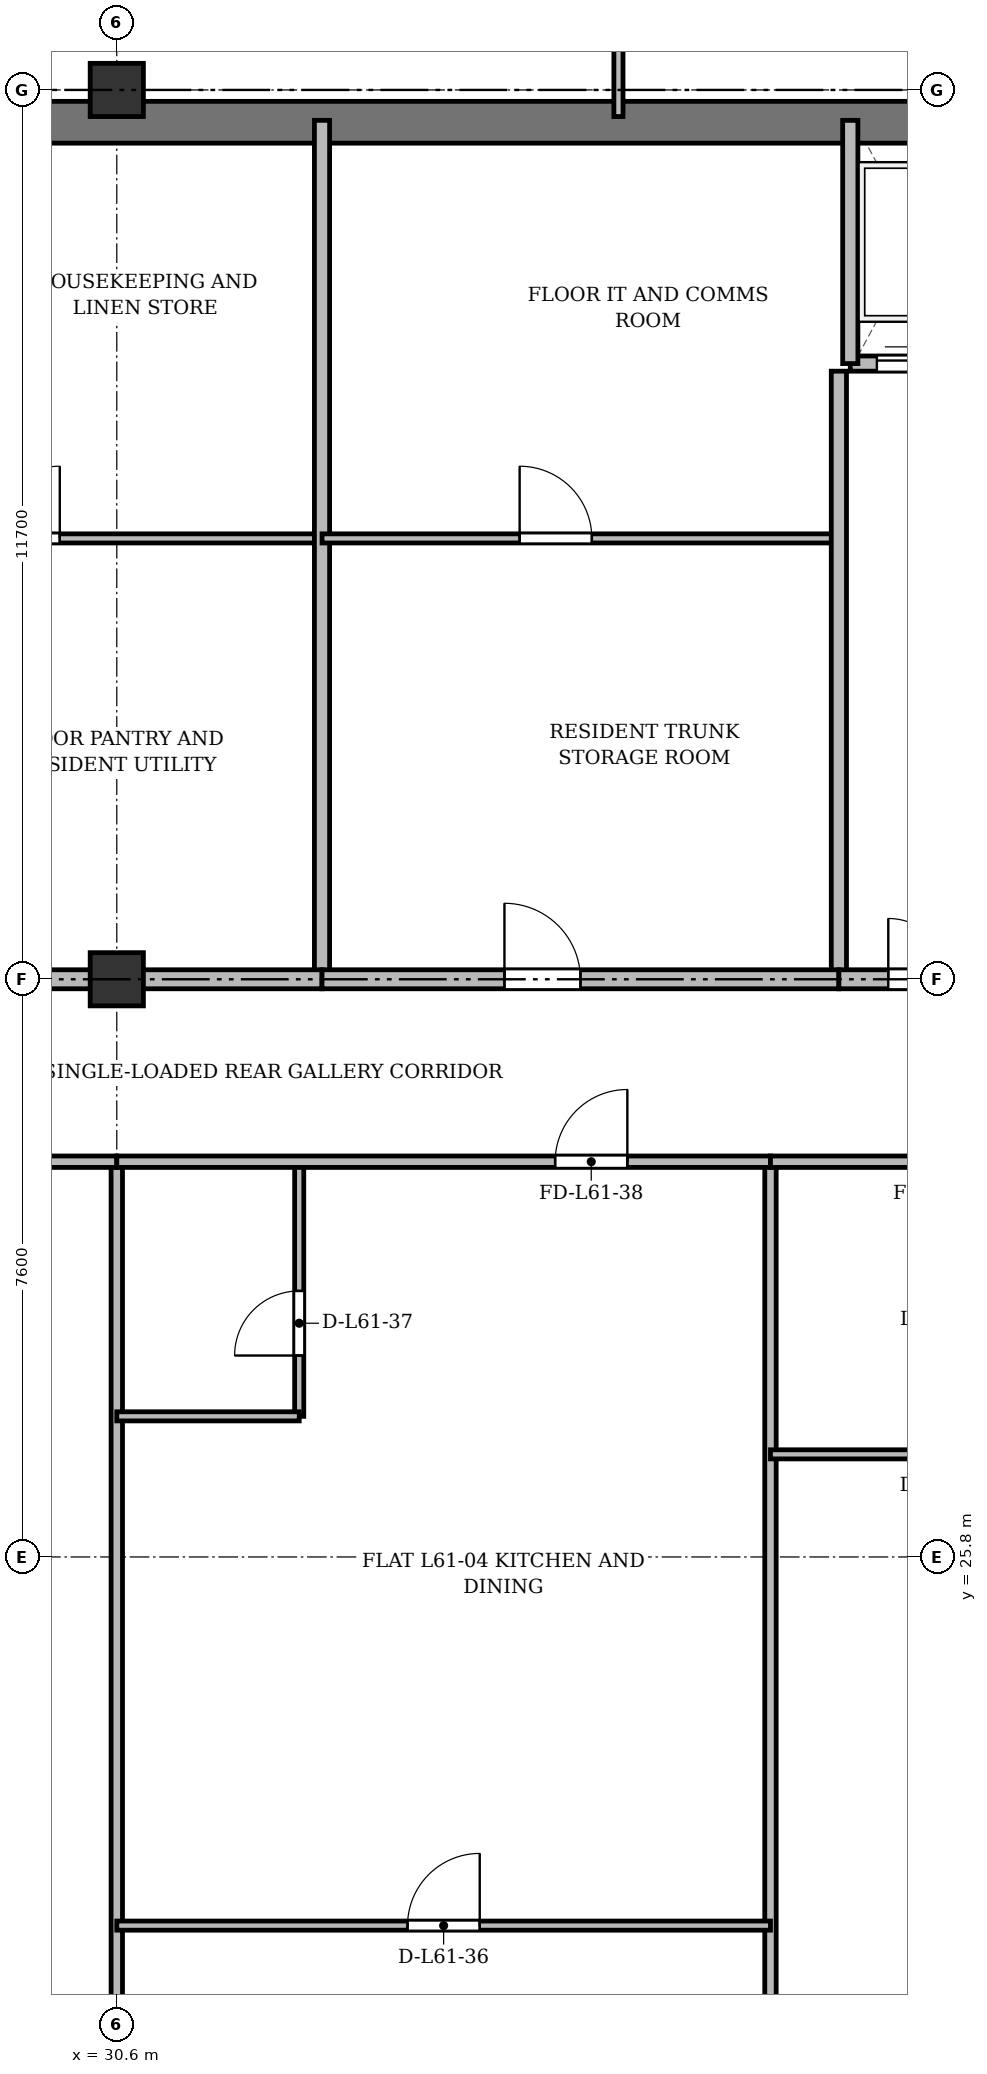
"""IFC4 building model, lengths in metres.
Left out: names, types, materials, properties, quantities, classifications, styles, units other than length and angle.
Written with IfcOpenShell. Run it as: python <this file> out.ifc"""

import sys

from ifc_helpers import new_model, si_unit, direction, frame, frame_2d, origin, origin_2d, place, context, subcontext, project, spatial, rectangle, extrude, source, transform, mapped, element, fill, save


model = new_model("IFC4")
c1 = context("Model", 3, precision=1e-05, world=origin(), true_north=direction((0.0, 1.0)))
c2 = subcontext(c1, "Body", "Model", "MODEL_VIEW")
j1 = project(units=[si_unit("LENGTHUNIT", "METRE"), si_unit("PLANEANGLEUNIT", "RADIAN")], contexts=[c1])
p1 = place(None, origin())
s1 = spatial("IfcSite", under=j1, at=p1, CompositionType="ELEMENT")
p2 = place(p1, origin())
s2 = spatial("IfcBuilding", under=s1, at=p2, CompositionType="ELEMENT")
p3 = place(p2, frame((0.0, 0.0, 233.7)))
s3 = spatial("IfcBuildingStorey", under=s2, at=p3, CompositionType="ELEMENT", Elevation=233.7)
m1 = source(origin(), c2, "Body", "SweptSolid", [
    extrude(rectangle(XDim=0.7, YDim=0.7, at=origin_2d()), origin(), (0.0, 0.0, 1.0), 3.6),
])
for number, where, z_axis, x_axis in (
    (1, (30.6, 33.4, 0.0), (0.0, 0.0, 1.0), (1.0, 0.0, 0.0)),
    (2, (30.6, 45.1, 0.0), (0.0, 0.0, 1.0), (1.0, 0.0, 0.0)),
):
    element("IfcColumn", number, at=place(p3, frame(where, z_axis=z_axis, x_axis=x_axis)), inside=s3, PredefinedType="COLUMN", context=c2, shape_type="MappedRepresentation", body=[
        mapped(m1, transform((0.0, 0.0, 0.0), x_axis=(1.0, 0.0, 0.0), y_axis=(0.0, 1.0, 0.0), z_axis=(0.0, 0.0, 1.0), scale=1.0)),
    ])
p4 = place(p3, frame((15.65, 44.675, 0.0), z_axis=(0.0, 0.0, 1.0), x_axis=(1.0, 0.0, 0.0)))
e3 = element("IfcWall", 3, at=p4, inside=s3, PredefinedType="SHEAR", context=c2, shape_type="SweptSolid", body=[
    extrude(rectangle(XDim=43.1, YDim=0.55, at=frame_2d((21.55, 0.0))), origin(), (0.0, 0.0, 1.0), 3.36),
])
p5 = place(p3, frame((26.3, 39.2, 0.0), z_axis=(0.0, 0.0, 1.0), x_axis=(1.0, 0.0, 0.0)))
e4 = element("IfcWall", 4, at=p5, inside=s3, PredefinedType="PARTITIONING", context=c2, shape_type="SweptSolid", body=[
    extrude(rectangle(XDim=7.0, YDim=0.12, at=frame_2d((3.5, 0.0))), origin(), (0.0, 0.0, 1.0), 2.86),
])
p6 = place(p5, frame((2.6, 0.0, 0.0)))
e5 = element("IfcOpeningElement", 5, at=p6, cuts=e4, PredefinedType="OPENING", context=c2, shape_type="SweptSolid", body=[
    extrude(rectangle(XDim=0.95, YDim=2.15, at=frame_2d((0.475, 1.075))), frame((0.0, 0.07, 0.0), z_axis=(0.0, -1.0, 0.0), x_axis=(1.0, 0.0, 0.0)), (0.0, 0.0, 1.0), 0.14),
])
p7 = place(p3, frame((33.3, 33.4, 0.0), z_axis=(0.0, 0.0, 1.0), x_axis=(0.0, 1.0, 0.0)))
e6 = element("IfcWall", 6, at=p7, inside=s3, PredefinedType="SOLIDWALL", context=c2, shape_type="SweptSolid", body=[
    extrude(rectangle(XDim=11.3, YDim=0.2, at=frame_2d((5.65, 0.0))), origin(), (0.0, 0.0, 1.0), 2.91),
])
p8 = place(p3, frame((33.3, 39.2, 0.0), z_axis=(0.0, 0.0, 1.0), x_axis=(1.0, 0.0, 0.0)))
e7 = element("IfcWall", 7, at=p8, inside=s3, PredefinedType="PARTITIONING", context=c2, shape_type="SweptSolid", body=[
    extrude(rectangle(XDim=6.8, YDim=0.12, at=frame_2d((3.4, 0.0))), origin(), (0.0, 0.0, 1.0), 3.36),
])
p9 = place(p8, frame((2.6, 0.0, 0.0)))
e8 = element("IfcOpeningElement", 8, at=p9, cuts=e7, PredefinedType="OPENING", context=c2, shape_type="SweptSolid", body=[
    extrude(rectangle(XDim=0.95, YDim=2.15, at=frame_2d((0.475, 1.075))), frame((0.0, 0.07, 0.0), z_axis=(0.0, -1.0, 0.0), x_axis=(1.0, 0.0, 0.0)), (0.0, 0.0, 1.0), 0.14),
])
p10 = place(p3, frame((40.1, 33.4, 0.0), z_axis=(0.0, 0.0, 1.0), x_axis=(0.0, 1.0, 0.0)))
e9 = element("IfcWall", 9, at=p10, inside=s3, PredefinedType="SOLIDWALL", context=c2, shape_type="SweptSolid", body=[
    extrude(rectangle(XDim=8.0, YDim=0.2, at=frame_2d((4.0, 0.0))), origin(), (0.0, 0.0, 1.0), 2.91),
])
p11 = place(p3, frame((40.25, 41.5, 0.0), z_axis=(0.0, 0.0, 1.0), x_axis=(1.0, 0.0, 0.0)))
e10 = element("IfcWall", 10, at=p11, inside=s3, PredefinedType="SOLIDWALL", context=c2, shape_type="SweptSolid", body=[
    extrude(rectangle(XDim=6.9, YDim=0.2, at=frame_2d((3.45, 0.0))), origin(), (0.0, 0.0, 1.0), 3.36),
])
p12 = place(p11, frame((0.35, 0.0, 0.0)))
e11 = element("IfcOpeningElement", 11, at=p12, cuts=e10, PredefinedType="OPENING", context=c2, shape_type="SweptSolid", body=[
    extrude(rectangle(XDim=1.05, YDim=2.15, at=frame_2d((0.525, 1.075))), frame((0.0, 0.11, 0.0), z_axis=(0.0, -1.0, 0.0), x_axis=(1.0, 0.0, 0.0)), (0.0, 0.0, 1.0), 0.22),
])
p13 = place(p11, frame((2.05, 0.0, 0.0)))
e12 = element("IfcOpeningElement", 12, at=p13, cuts=e10, PredefinedType="OPENING", context=c2, shape_type="SweptSolid", body=[
    extrude(rectangle(XDim=1.05, YDim=2.15, at=frame_2d((0.525, 1.075))), frame((0.0, 0.11, 0.0), z_axis=(0.0, -1.0, 0.0), x_axis=(1.0, 0.0, 0.0)), (0.0, 0.0, 1.0), 0.22),
])
p14 = place(p11, frame((3.75, 0.0, 0.0)))
e13 = element("IfcOpeningElement", 13, at=p14, cuts=e10, PredefinedType="OPENING", context=c2, shape_type="SweptSolid", body=[
    extrude(rectangle(XDim=1.05, YDim=2.15, at=frame_2d((0.525, 1.075))), frame((0.0, 0.11, 0.0), z_axis=(0.0, -1.0, 0.0), x_axis=(1.0, 0.0, 0.0)), (0.0, 0.0, 1.0), 0.22),
])
p15 = place(p11, frame((5.45, 0.0, 0.0)))
e14 = element("IfcOpeningElement", 14, at=p15, cuts=e10, PredefinedType="OPENING", context=c2, shape_type="SweptSolid", body=[
    extrude(rectangle(XDim=1.05, YDim=2.15, at=frame_2d((0.525, 1.075))), frame((0.0, 0.11, 0.0), z_axis=(0.0, -1.0, 0.0), x_axis=(1.0, 0.0, 0.0)), (0.0, 0.0, 1.0), 0.22),
])
p16 = place(p3, frame((40.25, 41.5, 0.0), z_axis=(0.0, 0.0, 1.0), x_axis=(0.0, 1.0, 0.0)))
e15 = element("IfcWall", 15, at=p16, inside=s3, PredefinedType="SOLIDWALL", context=c2, shape_type="SweptSolid", body=[
    extrude(rectangle(XDim=3.2, YDim=0.2, at=frame_2d((1.6, 0.0))), origin(), (0.0, 0.0, 1.0), 3.36),
])
p17 = place(p3, frame((26.3, 33.4, 0.0), z_axis=(0.0, 0.0, 1.0), x_axis=(1.0, 0.0, 0.0)))
e16 = element("IfcWall", 16, at=p17, inside=s3, PredefinedType="PARTITIONING", context=c2, shape_type="SweptSolid", body=[
    extrude(rectangle(XDim=7.0, YDim=0.25, at=frame_2d((3.5, 0.0))), origin(), (0.0, 0.0, 1.0), 2.91),
])
p18 = place(p17, frame((1.35, 0.0, 0.0)))
e17 = element("IfcOpeningElement", 17, at=p18, cuts=e16, PredefinedType="OPENING", context=c2, shape_type="SweptSolid", body=[
    extrude(rectangle(XDim=0.95, YDim=2.15, at=frame_2d((0.475, 1.075))), frame((0.0, 0.135, 0.0), z_axis=(0.0, -1.0, 0.0), x_axis=(1.0, 0.0, 0.0)), (0.0, 0.0, 1.0), 0.27),
])
p19 = place(p3, frame((33.3, 33.4, 0.0), z_axis=(0.0, 0.0, 1.0), x_axis=(1.0, 0.0, 0.0)))
e18 = element("IfcWall", 18, at=p19, inside=s3, PredefinedType="PARTITIONING", context=c2, shape_type="SweptSolid", body=[
    extrude(rectangle(XDim=6.8, YDim=0.25, at=frame_2d((3.4, 0.0))), origin(), (0.0, 0.0, 1.0), 2.91),
])
p20 = place(p19, frame((2.4, 0.0, 0.0)))
e19 = element("IfcOpeningElement", 19, at=p20, cuts=e18, PredefinedType="OPENING", context=c2, shape_type="SweptSolid", body=[
    extrude(rectangle(XDim=1.0, YDim=2.15, at=frame_2d((0.5, 1.075))), frame((0.0, 0.135, 0.0), z_axis=(0.0, -1.0, 0.0), x_axis=(1.0, 0.0, 0.0)), (0.0, 0.0, 1.0), 0.27),
])
p21 = place(p3, frame((40.1, 33.4, 0.0), z_axis=(0.0, 0.0, 1.0), x_axis=(1.0, 0.0, 0.0)))
e20 = element("IfcWall", 20, at=p21, inside=s3, PredefinedType="PARTITIONING", context=c2, shape_type="SweptSolid", body=[
    extrude(rectangle(XDim=7.05, YDim=0.25, at=frame_2d((3.525, 0.0))), origin(), (0.0, 0.0, 1.0), 2.91),
])
p22 = place(p21, frame((0.65, 0.0, 0.0)))
e21 = element("IfcOpeningElement", 21, at=p22, cuts=e20, PredefinedType="OPENING", context=c2, shape_type="SweptSolid", body=[
    extrude(rectangle(XDim=1.6, YDim=2.2, at=frame_2d((0.8, 1.1))), frame((0.0, 0.135, 0.0), z_axis=(0.0, -1.0, 0.0), x_axis=(1.0, 0.0, 0.0)), (0.0, 0.0, 1.0), 0.27),
])
p23 = place(p3, frame((37.2, 44.75, 0.0), z_axis=(0.0, 0.0, 1.0), x_axis=(0.0, 1.0, 0.0)))
e22 = element("IfcWall", 22, at=p23, inside=s3, PredefinedType="PARTITIONING", context=c2, shape_type="SweptSolid", body=[
    extrude(rectangle(XDim=3.61, YDim=0.12, at=frame_2d((1.805, 0.0))), origin(), (0.0, 0.0, 1.0), 2.91),
])
p24 = place(p23, frame((1.1, 0.0, 0.0)))
e23 = element("IfcOpeningElement", 23, at=p24, cuts=e22, PredefinedType="OPENING", context=c2, shape_type="SweptSolid", body=[
    extrude(rectangle(XDim=0.95, YDim=2.15, at=frame_2d((0.475, 1.075))), frame((0.0, 0.07, 0.0), z_axis=(0.0, -1.0, 0.0), x_axis=(1.0, 0.0, 0.0)), (0.0, 0.0, 1.0), 0.14),
])
p25 = place(p3, frame((30.6, 3.625, 0.0), z_axis=(0.0, 0.0, 1.0), x_axis=(0.0, 1.0, 0.0)))
e24 = element("IfcWall", 24, at=p25, inside=s3, PredefinedType="PARTITIONING", context=c2, shape_type="SweptSolid", body=[
    extrude(rectangle(XDim=27.375, YDim=0.15, at=frame_2d((13.688, 0.0))), origin(), (0.0, 0.0, 1.0), 2.86),
])
p26 = place(p3, frame((39.2, 3.625, 0.0), z_axis=(0.0, 0.0, 1.0), x_axis=(0.0, 1.0, 0.0)))
e25 = element("IfcWall", 25, at=p26, inside=s3, PredefinedType="PARTITIONING", context=c2, shape_type="SweptSolid", body=[
    extrude(rectangle(XDim=27.375, YDim=0.15, at=frame_2d((13.688, 0.0))), origin(), (0.0, 0.0, 1.0), 2.91),
])
p27 = place(p3, frame((23.4, 31.0, 0.0), z_axis=(0.0, 0.0, 1.0), x_axis=(1.0, 0.0, 0.0)))
e26 = element("IfcWall", 26, at=p27, inside=s3, PredefinedType="PARTITIONING", context=c2, shape_type="SweptSolid", body=[
    extrude(rectangle(XDim=7.2, YDim=0.15, at=frame_2d((3.6, 0.0))), origin(), (0.0, 0.0, 1.0), 2.86),
])
p28 = place(p27, frame((3.125, 0.0, 0.0)))
e27 = element("IfcOpeningElement", 27, at=p28, cuts=e26, PredefinedType="OPENING", context=c2, shape_type="SweptSolid", body=[
    extrude(rectangle(XDim=0.95, YDim=2.15, at=frame_2d((0.475, 1.075))), frame((0.0, 0.085, 0.0), z_axis=(0.0, -1.0, 0.0), x_axis=(1.0, 0.0, 0.0)), (0.0, 0.0, 1.0), 0.17),
])
p29 = place(p3, frame((30.6, 20.95, 0.0), z_axis=(0.0, 0.0, 1.0), x_axis=(1.0, 0.0, 0.0)))
e28 = element("IfcWall", 28, at=p29, inside=s3, PredefinedType="PARTITIONING", context=c2, shape_type="SweptSolid", body=[
    extrude(rectangle(XDim=8.6, YDim=0.12, at=frame_2d((4.3, 0.0))), origin(), (0.0, 0.0, 1.0), 2.86),
])
p30 = place(p29, frame((3.825, 0.0, 0.0)))
e29 = element("IfcOpeningElement", 29, at=p30, cuts=e28, PredefinedType="OPENING", context=c2, shape_type="SweptSolid", body=[
    extrude(rectangle(XDim=0.95, YDim=2.15, at=frame_2d((0.475, 1.075))), frame((0.0, 0.07, 0.0), z_axis=(0.0, -1.0, 0.0), x_axis=(1.0, 0.0, 0.0)), (0.0, 0.0, 1.0), 0.14),
])
p31 = place(p3, frame((33.0, 27.65, 0.0), z_axis=(0.0, 0.0, 1.0), x_axis=(0.0, 1.0, 0.0)))
e30 = element("IfcWall", 30, at=p31, inside=s3, PredefinedType="PARTITIONING", context=c2, shape_type="SweptSolid", body=[
    extrude(rectangle(XDim=3.35, YDim=0.12, at=frame_2d((1.675, 0.0))), origin(), (0.0, 0.0, 1.0), 3.36),
])
p32 = place(p31, frame((0.8, 0.0, 0.0)))
e31 = element("IfcOpeningElement", 31, at=p32, cuts=e30, PredefinedType="OPENING", context=c2, shape_type="SweptSolid", body=[
    extrude(rectangle(XDim=0.85, YDim=2.1, at=frame_2d((0.425, 1.05))), frame((0.0, 0.07, 0.0), z_axis=(0.0, -1.0, 0.0), x_axis=(1.0, 0.0, 0.0)), (0.0, 0.0, 1.0), 0.14),
])
p33 = place(p3, frame((30.6, 27.65, 0.0), z_axis=(0.0, 0.0, 1.0), x_axis=(1.0, 0.0, 0.0)))
e32 = element("IfcWall", 32, at=p33, inside=s3, PredefinedType="PARTITIONING", context=c2, shape_type="SweptSolid", body=[
    extrude(rectangle(XDim=2.4, YDim=0.12, at=frame_2d((1.2, 0.0))), origin(), (0.0, 0.0, 1.0), 2.86),
])
p34 = place(p3, frame((30.6, 31.0, 0.0), z_axis=(0.0, 0.0, 1.0), x_axis=(1.0, 0.0, 0.0)))
e33 = element("IfcWall", 33, at=p34, inside=s3, PredefinedType="PARTITIONING", context=c2, shape_type="SweptSolid", body=[
    extrude(rectangle(XDim=8.6, YDim=0.15, at=frame_2d((4.3, 0.0))), origin(), (0.0, 0.0, 1.0), 2.86),
])
p35 = place(p34, frame((5.767, 0.0, 0.0)))
e34 = element("IfcOpeningElement", 34, at=p35, cuts=e33, PredefinedType="OPENING", context=c2, shape_type="SweptSolid", body=[
    extrude(rectangle(XDim=0.95, YDim=2.15, at=frame_2d((0.475, 1.075))), frame((0.0, 0.085, 0.0), z_axis=(0.0, -1.0, 0.0), x_axis=(1.0, 0.0, 0.0)), (0.0, 0.0, 1.0), 0.17),
])
p36 = place(p3, frame((39.2, 31.0, 0.0), z_axis=(0.0, 0.0, 1.0), x_axis=(1.0, 0.0, 0.0)))
e35 = element("IfcWall", 35, at=p36, inside=s3, PredefinedType="PARTITIONING", context=c2, shape_type="SweptSolid", body=[
    extrude(rectangle(XDim=4.6, YDim=0.15, at=frame_2d((2.3, 0.0))), origin(), (0.0, 0.0, 1.0), 2.86),
])
p37 = place(p36, frame((1.825, 0.0, 0.0)))
e36 = element("IfcOpeningElement", 36, at=p37, cuts=e35, PredefinedType="OPENING", context=c2, shape_type="SweptSolid", body=[
    extrude(rectangle(XDim=0.95, YDim=2.15, at=frame_2d((0.475, 1.075))), frame((0.0, 0.085, 0.0), z_axis=(0.0, -1.0, 0.0), x_axis=(1.0, 0.0, 0.0)), (0.0, 0.0, 1.0), 0.17),
])
p38 = place(p3, frame((39.2, 27.15, 0.0), z_axis=(0.0, 0.0, 1.0), x_axis=(1.0, 0.0, 0.0)))
e37 = element("IfcWall", 37, at=p38, inside=s3, PredefinedType="PARTITIONING", context=c2, shape_type="SweptSolid", body=[
    extrude(rectangle(XDim=4.6, YDim=0.12, at=frame_2d((2.3, 0.0))), origin(), (0.0, 0.0, 1.0), 2.86),
])
p39 = place(p38, frame((1.825, 0.0, 0.0)))
e38 = element("IfcOpeningElement", 38, at=p39, cuts=e37, PredefinedType="OPENING", context=c2, shape_type="SweptSolid", body=[
    extrude(rectangle(XDim=0.95, YDim=2.15, at=frame_2d((0.475, 1.075))), frame((0.0, 0.07, 0.0), z_axis=(0.0, -1.0, 0.0), x_axis=(1.0, 0.0, 0.0)), (0.0, 0.0, 1.0), 0.14),
])
m2 = source(origin(), c2, "Body", "SweptSolid", [
    extrude(rectangle(XDim=0.95, YDim=2.15, at=frame_2d((0.475, 1.075))), frame((0.0, 0.025, 0.0), z_axis=(0.0, -1.0, 0.0), x_axis=(1.0, 0.0, 0.0)), (0.0, 0.0, 1.0), 0.05),
])
p40 = place(p6, origin())
e39 = element("IfcDoor", 39, at=p40, inside=s3, OperationType="SINGLE_SWING_RIGHT", PredefinedType="DOOR", context=c2, shape_type="MappedRepresentation", body=[
    mapped(m2, transform((0.0, 0.0, 0.0), x_axis=(1.0, 0.0, 0.0), y_axis=(0.0, 1.0, 0.0), z_axis=(0.0, 0.0, 1.0), scale=1.0)),
])
fill(e5, e39)
p41 = place(p9, origin())
e40 = element("IfcDoor", 40, at=p41, inside=s3, OperationType="SINGLE_SWING_LEFT", PredefinedType="DOOR", context=c2, shape_type="MappedRepresentation", body=[
    mapped(m2, transform((0.0, 0.0, 0.0), x_axis=(1.0, 0.0, 0.0), y_axis=(0.0, 1.0, 0.0), z_axis=(0.0, 0.0, 1.0), scale=1.0)),
])
fill(e8, e40)
m3 = source(origin(), c2, "Body", "SweptSolid", [
    extrude(rectangle(XDim=1.05, YDim=2.15, at=frame_2d((0.525, 1.075))), frame((0.0, 0.025, 0.0), z_axis=(0.0, -1.0, 0.0), x_axis=(1.0, 0.0, 0.0)), (0.0, 0.0, 1.0), 0.05),
])
p42 = place(p12, origin())
e41 = element("IfcDoor", 41, at=p42, inside=s3, OperationType="DOUBLE_DOOR_SLIDING", PredefinedType="DOOR", context=c2, shape_type="MappedRepresentation", body=[
    mapped(m3, transform((0.0, 0.0, 0.0), x_axis=(1.0, 0.0, 0.0), y_axis=(0.0, 1.0, 0.0), z_axis=(0.0, 0.0, 1.0), scale=1.0)),
])
fill(e11, e41)
m4 = source(origin(), c2, "Body", "SweptSolid", [
    extrude(rectangle(XDim=1.0, YDim=2.15, at=frame_2d((0.5, 1.075))), frame((0.0, 0.025, 0.0), z_axis=(0.0, -1.0, 0.0), x_axis=(1.0, 0.0, 0.0)), (0.0, 0.0, 1.0), 0.05),
])
p43 = place(p20, origin())
e42 = element("IfcDoor", 42, at=p43, inside=s3, OperationType="SINGLE_SWING_LEFT", PredefinedType="DOOR", context=c2, shape_type="MappedRepresentation", body=[
    mapped(m4, transform((0.0, 0.0, 0.0), x_axis=(1.0, 0.0, 0.0), y_axis=(0.0, 1.0, 0.0), z_axis=(0.0, 0.0, 1.0), scale=1.0)),
])
fill(e19, e42)
m5 = source(origin(), c2, "Body", "SweptSolid", [
    extrude(rectangle(XDim=1.6, YDim=2.2, at=frame_2d((0.8, 1.1))), frame((0.0, 0.025, 0.0), z_axis=(0.0, -1.0, 0.0), x_axis=(1.0, 0.0, 0.0)), (0.0, 0.0, 1.0), 0.05),
])
p44 = place(p22, origin())
e43 = element("IfcDoor", 43, at=p44, inside=s3, OperationType="DOUBLE_DOOR_SINGLE_SWING", PredefinedType="DOOR", context=c2, shape_type="MappedRepresentation", body=[
    mapped(m5, transform((0.0, 0.0, 0.0), x_axis=(1.0, 0.0, 0.0), y_axis=(0.0, 1.0, 0.0), z_axis=(0.0, 0.0, 1.0), scale=1.0)),
])
fill(e21, e43)
p45 = place(p30, origin())
e44 = element("IfcDoor", 44, at=p45, inside=s3, OperationType="SINGLE_SWING_RIGHT", PredefinedType="DOOR", context=c2, shape_type="MappedRepresentation", body=[
    mapped(m2, transform((0.0, 0.0, 0.0), x_axis=(1.0, 0.0, 0.0), y_axis=(0.0, 1.0, 0.0), z_axis=(0.0, 0.0, 1.0), scale=1.0)),
])
fill(e29, e44)
m6 = source(origin(), c2, "Body", "SweptSolid", [
    extrude(rectangle(XDim=0.85, YDim=2.1, at=frame_2d((0.425, 1.05))), frame((0.0, 0.025, 0.0), z_axis=(0.0, -1.0, 0.0), x_axis=(1.0, 0.0, 0.0)), (0.0, 0.0, 1.0), 0.05),
])
p46 = place(p32, origin())
e45 = element("IfcDoor", 45, at=p46, inside=s3, OperationType="SINGLE_SWING_LEFT", PredefinedType="DOOR", context=c2, shape_type="MappedRepresentation", body=[
    mapped(m6, transform((0.0, 0.0, 0.0), x_axis=(1.0, 0.0, 0.0), y_axis=(0.0, 1.0, 0.0), z_axis=(0.0, 0.0, 1.0), scale=1.0)),
])
fill(e31, e45)
p47 = place(p35, origin())
e46 = element("IfcDoor", 46, at=p47, inside=s3, OperationType="SINGLE_SWING_RIGHT", PredefinedType="DOOR", context=c2, shape_type="MappedRepresentation", body=[
    mapped(m2, transform((0.0, 0.0, 0.0), x_axis=(1.0, 0.0, 0.0), y_axis=(0.0, 1.0, 0.0), z_axis=(0.0, 0.0, 1.0), scale=1.0)),
])
fill(e34, e46)
save(model, sys.argv[1])
